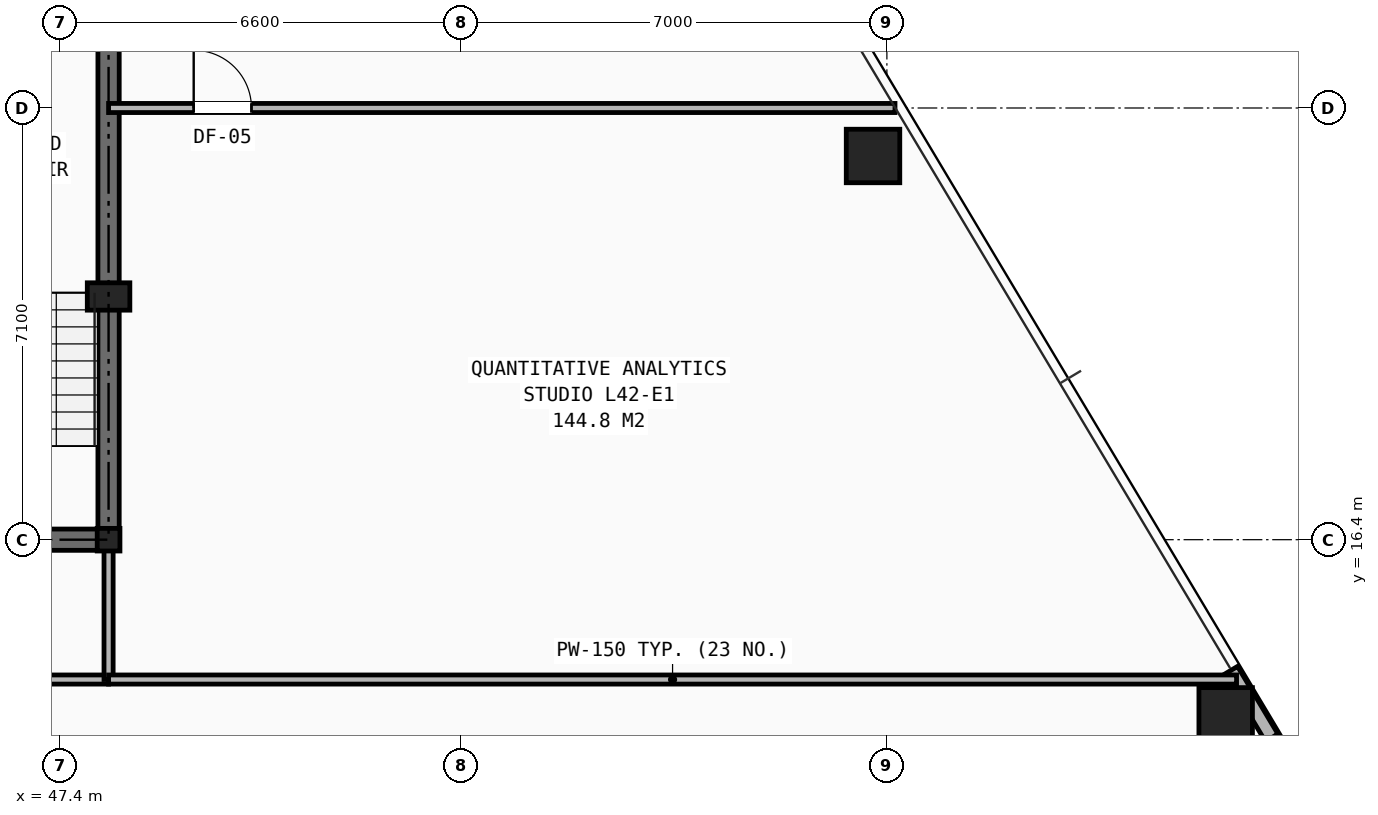
"""IFC4 building model, lengths in metres.
Left out: names, types, materials, properties, quantities, classifications, styles, units other than length and angle.
Written with IfcOpenShell. Run it as: python <this file> out.ifc"""

import sys

from ifc_helpers import new_model, si_unit, direction, frame, frame_2d, origin, origin_2d, place, context, subcontext, project, spatial, rectangle, hollow_rectangle, i_section, extrude, element, fill, save


model = new_model("IFC4")
c1 = context("Model", 3, precision=1e-05, world=origin(), true_north=direction((0.0, 1.0)))
c2 = subcontext(c1, "Body", "Model", "MODEL_VIEW")
j1 = project(units=[si_unit("LENGTHUNIT", "METRE"), si_unit("PLANEANGLEUNIT", "RADIAN")], contexts=[c1])
p1 = place(None, origin())
s1 = spatial("IfcSite", under=j1, at=p1, CompositionType="ELEMENT")
p2 = place(p1, origin())
s2 = spatial("IfcBuilding", under=s1, at=p2, CompositionType="ELEMENT")
p3 = place(p2, frame((0.0, 0.0, 147.05)))
s3 = spatial("IfcBuildingStorey", under=s2, at=p3, CompositionType="ELEMENT", Elevation=147.05)
p4 = place(p3, frame((48.2, 16.4, 0.0), z_axis=(0.0, 0.0, 1.0), x_axis=(1.0, 0.0, 0.0)))
e1 = element("IfcColumn", 1, at=p4, inside=s3, PredefinedType="COLUMN", context=c2, shape_type="SweptSolid", body=[
    extrude(i_section(OverallWidth=0.374, OverallDepth=0.372, WebThickness=0.016, FlangeThickness=0.026, at=origin_2d()), origin(), (0.0, 0.0, 1.0), 3.45),
])
p5 = place(p3, frame((48.2, 20.4, 0.0), z_axis=(0.0, 0.0, 1.0), x_axis=(1.0, 0.0, 0.0)))
e2 = element("IfcColumn", 2, at=p5, inside=s3, PredefinedType="PILASTER", context=c2, shape_type="SweptSolid", body=[
    extrude(rectangle(XDim=0.7, YDim=0.45, at=origin_2d()), origin(), (0.0, 0.0, 1.0), 3.45),
])
for number, where, z_axis, x_axis in (
    (3, (66.572, 13.527, 0.0), (0.0, 0.0, 1.0), (1.0, 0.0, 0.0)),
    (4, (60.772, 22.711, 0.0), (0.0, 0.0, 1.0), (1.0, 0.0, 0.0)),
):
    element("IfcColumn", number, at=place(p3, frame(where, z_axis=z_axis, x_axis=x_axis)), inside=s3, PredefinedType="COLUMN", context=c2, shape_type="SweptSolid", body=[
        extrude(hollow_rectangle(XDim=0.88, YDim=0.88, WallThickness=0.06, at=origin_2d()), origin(), (0.0, 0.0, 1.0), 3.45),
    ])
p6 = place(p3, frame((67.328, 13.143, 0.0), z_axis=(0.0, 0.0, 1.0), x_axis=(-0.513024934393, 0.858373704567, 0.0)))
e5 = element("IfcWall", 5, at=p6, inside=s3, PredefinedType="SHEAR", context=c2, shape_type="SweptSolid", body=[
    extrude(rectangle(XDim=1.294, YDim=0.24, at=frame_2d((0.647, 0.0))), origin(), (0.0, 0.0, 1.0), 2.583),
])
p7 = place(p3, frame((31.8, 16.4, 0.0), z_axis=(0.0, 0.0, 1.0), x_axis=(1.0, 0.0, 0.0)))
e6 = element("IfcWall", 6, at=p7, inside=s3, PredefinedType="SHEAR", context=c2, shape_type="SweptSolid", body=[
    extrude(rectangle(XDim=16.4, YDim=0.35, at=frame_2d((8.2, 0.0))), origin(), (0.0, 0.0, 1.0), 3.21),
])
p8 = place(p7, frame((7.75, 0.0, 0.0)))
e7 = element("IfcOpeningElement", 7, at=p8, cuts=e6, PredefinedType="OPENING", context=c2, shape_type="SweptSolid", body=[
    extrude(rectangle(XDim=0.9, YDim=2.1, at=frame_2d((0.45, 1.05))), frame((0.0, 0.185, 0.0), z_axis=(0.0, -1.0, 0.0), x_axis=(1.0, 0.0, 0.0)), (0.0, 0.0, 1.0), 0.37),
])
p9 = place(p7, frame((4.2, 0.0, 0.0)))
e8 = element("IfcOpeningElement", 8, at=p9, cuts=e6, PredefinedType="OPENING", context=c2, shape_type="SweptSolid", body=[
    extrude(rectangle(XDim=0.95, YDim=2.1, at=frame_2d((0.475, 1.05))), frame((0.0, 0.185, 0.0), z_axis=(0.0, -1.0, 0.0), x_axis=(1.0, 0.0, 0.0)), (0.0, 0.0, 1.0), 0.37),
])
p10 = place(p7, frame((10.6, 0.0, 0.0)))
e9 = element("IfcOpeningElement", 9, at=p10, cuts=e6, PredefinedType="OPENING", context=c2, shape_type="SweptSolid", body=[
    extrude(rectangle(XDim=0.95, YDim=2.1, at=frame_2d((0.475, 1.05))), frame((0.0, 0.185, 0.0), z_axis=(0.0, -1.0, 0.0), x_axis=(1.0, 0.0, 0.0)), (0.0, 0.0, 1.0), 0.37),
])
p11 = place(p3, frame((48.2, 16.4, 0.0), z_axis=(0.0, 0.0, 1.0), x_axis=(0.0, 1.0, 0.0)))
e10 = element("IfcWall", 10, at=p11, inside=s3, PredefinedType="SHEAR", context=c2, shape_type="SweptSolid", body=[
    extrude(rectangle(XDim=14.8, YDim=0.35, at=frame_2d((7.4, 0.0))), origin(), (0.0, 0.0, 1.0), 3.21),
])
p12 = place(p11, frame((11.0, 0.0, 0.0)))
e11 = element("IfcOpeningElement", 11, at=p12, cuts=e10, PredefinedType="OPENING", context=c2, shape_type="SweptSolid", body=[
    extrude(rectangle(XDim=1.1, YDim=2.15, at=frame_2d((0.55, 1.075))), frame((0.0, 0.185, 0.0), z_axis=(0.0, -1.0, 0.0), x_axis=(1.0, 0.0, 0.0)), (0.0, 0.0, 1.0), 0.37),
])
p13 = place(p3, frame((29.6, 14.1, 0.0), z_axis=(0.0, 0.0, 1.0), x_axis=(1.0, 0.0, 0.0)))
e12 = element("IfcWall", 12, at=p13, inside=s3, PredefinedType="PARTITIONING", context=c2, shape_type="SweptSolid", body=[
    extrude(rectangle(XDim=18.6, YDim=0.15, at=frame_2d((9.3, 0.0))), origin(), (0.0, 0.0, 1.0), 2.225),
])
p14 = place(p13, frame((0.55, 0.0, 0.0)))
e13 = element("IfcOpeningElement", 13, at=p14, cuts=e12, PredefinedType="OPENING", context=c2, shape_type="SweptSolid", body=[
    extrude(rectangle(XDim=0.95, YDim=2.1, at=frame_2d((0.475, 1.05))), frame((0.0, 0.085, 0.0), z_axis=(0.0, -1.0, 0.0), x_axis=(1.0, 0.0, 0.0)), (0.0, 0.0, 1.0), 0.17),
])
p15 = place(p3, frame((48.2, 14.1, 0.0), z_axis=(0.0, 0.0, 1.0), x_axis=(0.0, 1.0, 0.0)))
e14 = element("IfcWall", 14, at=p15, inside=s3, PredefinedType="PARTITIONING", context=c2, shape_type="SweptSolid", body=[
    extrude(rectangle(XDim=2.3, YDim=0.15, at=frame_2d((1.15, 0.0))), origin(), (0.0, 0.0, 1.0), 2.661),
])
p16 = place(p3, frame((48.2, 14.1, 0.0), z_axis=(0.0, 0.0, 1.0), x_axis=(1.0, 0.0, 0.0)))
e15 = element("IfcWall", 15, at=p16, inside=s3, PredefinedType="PARTITIONING", context=c2, shape_type="SweptSolid", body=[
    extrude(rectangle(XDim=18.551, YDim=0.15, at=frame_2d((9.275, 0.0))), origin(), (0.0, 0.0, 1.0), 2.589),
])
p17 = place(p3, frame((48.2, 23.5, 0.0), z_axis=(0.0, 0.0, 1.0), x_axis=(1.0, 0.0, 0.0)))
e16 = element("IfcWall", 16, at=p17, inside=s3, PredefinedType="PARTITIONING", context=c2, shape_type="SweptSolid", body=[
    extrude(rectangle(XDim=12.933, YDim=0.15, at=frame_2d((6.467, 0.0))), origin(), (0.0, 0.0, 1.0), 2.589),
])
p18 = place(p17, frame((1.4, 0.0, 0.0)))
e17 = element("IfcOpeningElement", 17, at=p18, cuts=e16, PredefinedType="OPENING", context=c2, shape_type="SweptSolid", body=[
    extrude(rectangle(XDim=0.95, YDim=2.1, at=frame_2d((0.475, 1.05))), frame((0.0, 0.085, 0.0), z_axis=(0.0, -1.0, 0.0), x_axis=(1.0, 0.0, 0.0)), (0.0, 0.0, 1.0), 0.17),
])
p19 = place(p18, origin())
e18 = element("IfcDoor", 18, at=p19, inside=s3, OperationType="SINGLE_SWING_LEFT", PredefinedType="DOOR", context=c2, shape_type="SweptSolid", body=[
    extrude(rectangle(XDim=0.95, YDim=2.1, at=frame_2d((0.475, 1.05))), frame((0.0, 0.025, 0.0), z_axis=(0.0, -1.0, 0.0), x_axis=(1.0, 0.0, 0.0)), (0.0, 0.0, 1.0), 0.05),
])
fill(e17, e18)
save(model, sys.argv[1])
